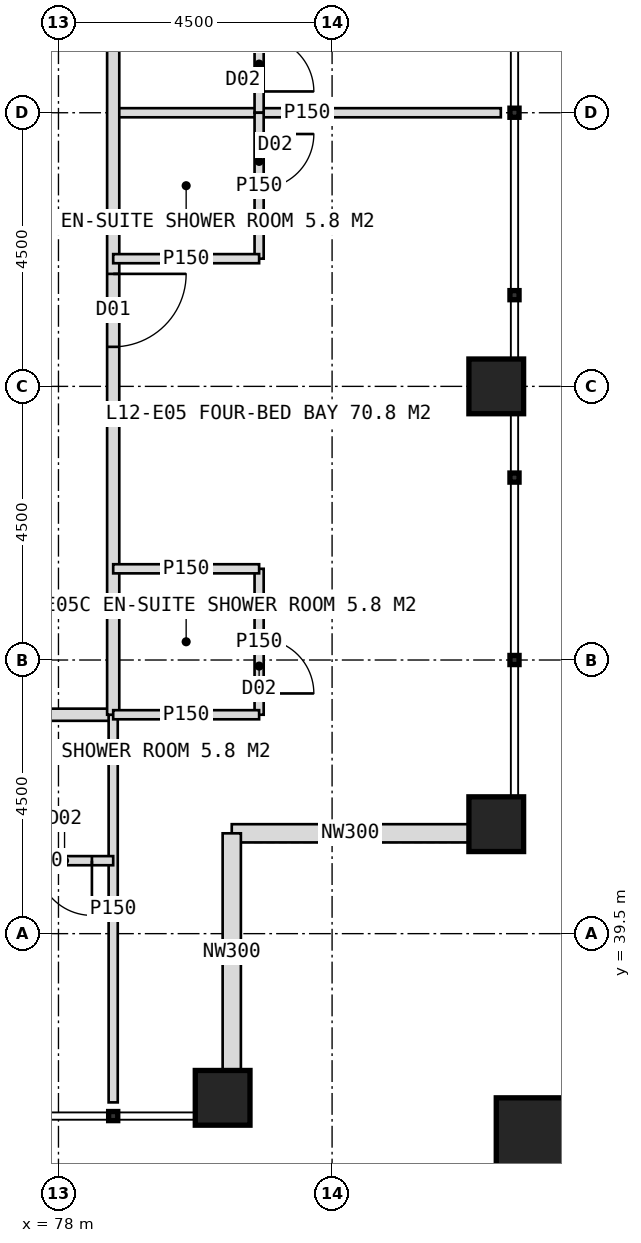
"""IFC4 building model, lengths in metres.
Left out: names, types, materials, properties, quantities, classifications, styles, units other than length and angle.
Written with IfcOpenShell. Run it as: python <this file> out.ifc"""

import sys

from ifc_helpers import new_model, si_unit, direction, frame, frame_2d, origin, origin_2d, place, context, subcontext, project, spatial, rectangle, hollow_rectangle, extrude, element, fill, save


model = new_model("IFC4")
c1 = context("Model", 3, precision=1e-05, world=origin(), true_north=direction((0.0, 1.0)))
c2 = subcontext(c1, "Body", "Model", "MODEL_VIEW")
j1 = project(units=[si_unit("LENGTHUNIT", "METRE"), si_unit("PLANEANGLEUNIT", "RADIAN")], contexts=[c1])
p1 = place(None, origin())
s1 = spatial("IfcSite", under=j1, at=p1, CompositionType="ELEMENT")
p2 = place(p1, origin())
s2 = spatial("IfcBuilding", under=s1, at=p2, CompositionType="ELEMENT")
p3 = place(p2, frame((0.0, 0.0, 55.0)))
s3 = spatial("IfcBuildingStorey", under=s2, at=p3, CompositionType="ELEMENT", Elevation=55.0)
for number, where, z_axis, x_axis in (
    (1, (85.2, 41.3, 0.0), (0.0, 0.0, 1.0), (1.0, 0.0, 0.0)),
    (2, (85.2, 48.5, 0.0), (0.0, 0.0, 1.0), (1.0, 0.0, 0.0)),
    (3, (80.7, 36.8, 0.0), (0.0, 0.0, 1.0), (1.0, 0.0, 0.0)),
):
    element("IfcColumn", number, at=place(p3, frame(where, z_axis=z_axis, x_axis=x_axis)), inside=s3, PredefinedType="COLUMN", context=c2, shape_type="SweptSolid", body=[
        extrude(hollow_rectangle(XDim=0.9, YDim=0.9, WallThickness=0.08, at=origin_2d()), origin(), (0.0, 0.0, 1.0), 4.0),
    ])
p4 = place(p3, frame((86.1, 35.9, 0.0), z_axis=(0.0, 0.0, 1.0), x_axis=(1.0, 0.0, 0.0)))
e4 = element("IfcColumn", 4, at=p4, inside=s3, PredefinedType="COLUMN", context=c2, shape_type="SweptSolid", body=[
    extrude(hollow_rectangle(XDim=1.8, YDim=1.8, WallThickness=0.1, at=origin_2d()), origin(), (0.0, 0.0, 1.0), 4.0),
])
for number, where, z_axis, x_axis in (
    (5, (84.75, 41.15, 0.0), (0.0, 0.0, 1.0), (-1.0, 0.0, 0.0)),
    (6, (80.85, 41.15, 0.0), (0.0, 0.0, 1.0), (0.0, -1.0, 0.0)),
):
    element("IfcWall", number, at=place(p3, frame(where, z_axis=z_axis, x_axis=x_axis)), inside=s3, PredefinedType="ELEMENTEDWALL", context=c2, shape_type="SweptSolid", body=[
        extrude(rectangle(XDim=3.9, YDim=0.3, at=frame_2d((1.95, 0.0))), origin(), (0.0, 0.0, 1.0), 2.95),
    ])
p5 = place(p3, frame((78.9, 43.1, 0.0), z_axis=(0.0, 0.0, 1.0), x_axis=(-1.0, 0.0, 0.0)))
e7 = element("IfcWall", 7, at=p5, inside=s3, PredefinedType="PARTITIONING", context=c2, shape_type="SweptSolid", body=[
    extrude(rectangle(XDim=37.8, YDim=0.2, at=frame_2d((18.9, 0.0))), origin(), (0.0, 0.0, 1.0), 3.75),
])
p6 = place(p5, frame((2.65, 0.0, 0.0)))
e8 = element("IfcOpeningElement", 8, at=p6, cuts=e7, PredefinedType="OPENING", context=c2, shape_type="SweptSolid", body=[
    extrude(rectangle(XDim=1.2, YDim=2.2, at=frame_2d((0.6, 1.1))), frame((0.0, 0.11, 0.0), z_axis=(0.0, -1.0, 0.0), x_axis=(1.0, 0.0, 0.0)), (0.0, 0.0, 1.0), 0.22),
])
p7 = place(p5, frame((12.55, 0.0, 0.0)))
e9 = element("IfcOpeningElement", 9, at=p7, cuts=e7, PredefinedType="OPENING", context=c2, shape_type="SweptSolid", body=[
    extrude(rectangle(XDim=1.2, YDim=2.2, at=frame_2d((0.6, 1.1))), frame((0.0, 0.11, 0.0), z_axis=(0.0, -1.0, 0.0), x_axis=(1.0, 0.0, 0.0)), (0.0, 0.0, 1.0), 0.22),
])
p8 = place(p5, frame((21.55, 0.0, 0.0)))
e10 = element("IfcOpeningElement", 10, at=p8, cuts=e7, PredefinedType="OPENING", context=c2, shape_type="SweptSolid", body=[
    extrude(rectangle(XDim=1.2, YDim=2.2, at=frame_2d((0.6, 1.1))), frame((0.0, 0.11, 0.0), z_axis=(0.0, -1.0, 0.0), x_axis=(1.0, 0.0, 0.0)), (0.0, 0.0, 1.0), 0.22),
])
p9 = place(p5, frame((30.55, 0.0, 0.0)))
e11 = element("IfcOpeningElement", 11, at=p9, cuts=e7, PredefinedType="OPENING", context=c2, shape_type="SweptSolid", body=[
    extrude(rectangle(XDim=1.2, YDim=2.2, at=frame_2d((0.6, 1.1))), frame((0.0, 0.11, 0.0), z_axis=(0.0, -1.0, 0.0), x_axis=(1.0, 0.0, 0.0)), (0.0, 0.0, 1.0), 0.22),
])
p10 = place(p3, frame((78.9, 43.1, 0.0), z_axis=(0.0, 0.0, 1.0), x_axis=(0.0, -1.0, 0.0)))
e12 = element("IfcWall", 12, at=p10, inside=s3, PredefinedType="PARTITIONING", context=c2, shape_type="SweptSolid", body=[
    extrude(rectangle(XDim=6.375, YDim=0.15, at=frame_2d((3.188, 0.0))), origin(), (0.0, 0.0, 1.0), 3.75),
])
p11 = place(p3, frame((78.9, 40.7, 0.0), z_axis=(0.0, 0.0, 1.0), x_axis=(-1.0, 0.0, 0.0)))
e13 = element("IfcWall", 13, at=p11, inside=s3, PredefinedType="PARTITIONING", context=c2, shape_type="SweptSolid", body=[
    extrude(rectangle(XDim=2.4, YDim=0.15, at=frame_2d((1.2, 0.0))), origin(), (0.0, 0.0, 1.0), 3.75),
])
p12 = place(p11, frame((0.35, 0.0, 0.0)))
e14 = element("IfcOpeningElement", 14, at=p12, cuts=e13, PredefinedType="OPENING", context=c2, shape_type="SweptSolid", body=[
    extrude(rectangle(XDim=0.9, YDim=2.1, at=frame_2d((0.45, 1.05))), frame((0.0, 0.085, 0.0), z_axis=(0.0, -1.0, 0.0), x_axis=(1.0, 0.0, 0.0)), (0.0, 0.0, 1.0), 0.17),
])
p13 = place(p3, frame((78.9, 53.0, 0.0), z_axis=(0.0, 0.0, 1.0), x_axis=(1.0, 0.0, 0.0)))
e15 = element("IfcWall", 15, at=p13, inside=s3, PredefinedType="PARTITIONING", context=c2, shape_type="SweptSolid", body=[
    extrude(rectangle(XDim=6.375, YDim=0.15, at=frame_2d((3.188, 0.0))), origin(), (0.0, 0.0, 1.0), 3.75),
])
p14 = place(p3, frame((78.9, 80.9, 0.0), z_axis=(0.0, 0.0, 1.0), x_axis=(0.0, -1.0, 0.0)))
e16 = element("IfcWall", 16, at=p14, inside=s3, PredefinedType="PARTITIONING", context=c2, shape_type="SweptSolid", body=[
    extrude(rectangle(XDim=37.8, YDim=0.2, at=frame_2d((18.9, 0.0))), origin(), (0.0, 0.0, 1.0), 3.75),
])
p15 = place(p14, frame((3.25, 0.0, 0.0)))
e17 = element("IfcOpeningElement", 17, at=p15, cuts=e16, PredefinedType="OPENING", context=c2, shape_type="SweptSolid", body=[
    extrude(rectangle(XDim=1.2, YDim=2.2, at=frame_2d((0.6, 1.1))), frame((0.0, 0.11, 0.0), z_axis=(0.0, -1.0, 0.0), x_axis=(1.0, 0.0, 0.0)), (0.0, 0.0, 1.0), 0.22),
])
p16 = place(p14, frame((9.55, 0.0, 0.0)))
e18 = element("IfcOpeningElement", 18, at=p16, cuts=e16, PredefinedType="OPENING", context=c2, shape_type="SweptSolid", body=[
    extrude(rectangle(XDim=1.2, YDim=2.2, at=frame_2d((0.6, 1.1))), frame((0.0, 0.11, 0.0), z_axis=(0.0, -1.0, 0.0), x_axis=(1.0, 0.0, 0.0)), (0.0, 0.0, 1.0), 0.22),
])
p17 = place(p14, frame((15.55, 0.0, 0.0)))
e19 = element("IfcOpeningElement", 19, at=p17, cuts=e16, PredefinedType="OPENING", context=c2, shape_type="SweptSolid", body=[
    extrude(rectangle(XDim=1.2, YDim=2.2, at=frame_2d((0.6, 1.1))), frame((0.0, 0.11, 0.0), z_axis=(0.0, -1.0, 0.0), x_axis=(1.0, 0.0, 0.0)), (0.0, 0.0, 1.0), 0.22),
])
p18 = place(p14, frame((21.55, 0.0, 0.0)))
e20 = element("IfcOpeningElement", 20, at=p18, cuts=e16, PredefinedType="OPENING", context=c2, shape_type="SweptSolid", body=[
    extrude(rectangle(XDim=1.2, YDim=2.2, at=frame_2d((0.6, 1.1))), frame((0.0, 0.11, 0.0), z_axis=(0.0, -1.0, 0.0), x_axis=(1.0, 0.0, 0.0)), (0.0, 0.0, 1.0), 0.22),
])
p19 = place(p14, frame((30.55, 0.0, 0.0)))
e21 = element("IfcOpeningElement", 21, at=p19, cuts=e16, PredefinedType="OPENING", context=c2, shape_type="SweptSolid", body=[
    extrude(rectangle(XDim=1.2, YDim=2.2, at=frame_2d((0.6, 1.1))), frame((0.0, 0.11, 0.0), z_axis=(0.0, -1.0, 0.0), x_axis=(1.0, 0.0, 0.0)), (0.0, 0.0, 1.0), 0.22),
])
p20 = place(p3, frame((81.3, 55.4, 0.0), z_axis=(0.0, 0.0, 1.0), x_axis=(0.0, -1.0, 0.0)))
e22 = element("IfcWall", 22, at=p20, inside=s3, PredefinedType="PARTITIONING", context=c2, shape_type="SweptSolid", body=[
    extrude(rectangle(XDim=2.4, YDim=0.15, at=frame_2d((1.2, 0.0))), origin(), (0.0, 0.0, 1.0), 3.75),
])
p21 = place(p20, frame((1.15, 0.0, 0.0)))
e23 = element("IfcOpeningElement", 23, at=p21, cuts=e22, PredefinedType="OPENING", context=c2, shape_type="SweptSolid", body=[
    extrude(rectangle(XDim=0.9, YDim=2.1, at=frame_2d((0.45, 1.05))), frame((0.0, 0.085, 0.0), z_axis=(0.0, -1.0, 0.0), x_axis=(1.0, 0.0, 0.0)), (0.0, 0.0, 1.0), 0.17),
])
p22 = place(p3, frame((81.3, 53.0, 0.0), z_axis=(0.0, 0.0, 1.0), x_axis=(0.0, -1.0, 0.0)))
e24 = element("IfcWall", 24, at=p22, inside=s3, PredefinedType="PARTITIONING", context=c2, shape_type="SweptSolid", body=[
    extrude(rectangle(XDim=2.4, YDim=0.15, at=frame_2d((1.2, 0.0))), origin(), (0.0, 0.0, 1.0), 3.75),
])
p23 = place(p22, frame((0.35, 0.0, 0.0)))
e25 = element("IfcOpeningElement", 25, at=p23, cuts=e24, PredefinedType="OPENING", context=c2, shape_type="SweptSolid", body=[
    extrude(rectangle(XDim=0.9, YDim=2.1, at=frame_2d((0.45, 1.05))), frame((0.0, 0.085, 0.0), z_axis=(0.0, -1.0, 0.0), x_axis=(1.0, 0.0, 0.0)), (0.0, 0.0, 1.0), 0.17),
])
p24 = place(p3, frame((78.9, 50.6, 0.0), z_axis=(0.0, 0.0, 1.0), x_axis=(1.0, 0.0, 0.0)))
e26 = element("IfcWall", 26, at=p24, inside=s3, PredefinedType="PARTITIONING", context=c2, shape_type="SweptSolid", body=[
    extrude(rectangle(XDim=2.4, YDim=0.15, at=frame_2d((1.2, 0.0))), origin(), (0.0, 0.0, 1.0), 3.75),
])
p25 = place(p3, frame((81.3, 45.5, 0.0), z_axis=(0.0, 0.0, 1.0), x_axis=(0.0, -1.0, 0.0)))
e27 = element("IfcWall", 27, at=p25, inside=s3, PredefinedType="PARTITIONING", context=c2, shape_type="SweptSolid", body=[
    extrude(rectangle(XDim=2.4, YDim=0.15, at=frame_2d((1.2, 0.0))), origin(), (0.0, 0.0, 1.0), 3.75),
])
p26 = place(p25, frame((1.15, 0.0, 0.0)))
e28 = element("IfcOpeningElement", 28, at=p26, cuts=e27, PredefinedType="OPENING", context=c2, shape_type="SweptSolid", body=[
    extrude(rectangle(XDim=0.9, YDim=2.1, at=frame_2d((0.45, 1.05))), frame((0.0, 0.085, 0.0), z_axis=(0.0, -1.0, 0.0), x_axis=(1.0, 0.0, 0.0)), (0.0, 0.0, 1.0), 0.17),
])
for number, where, z_axis, x_axis in (
    (29, (78.9, 45.5, 0.0), (0.0, 0.0, 1.0), (1.0, 0.0, 0.0)),
    (30, (78.9, 43.1, 0.0), (0.0, 0.0, 1.0), (1.0, 0.0, 0.0)),
):
    element("IfcWall", number, at=place(p3, frame(where, z_axis=z_axis, x_axis=x_axis)), inside=s3, PredefinedType="PARTITIONING", context=c2, shape_type="SweptSolid", body=[
        extrude(rectangle(XDim=2.4, YDim=0.15, at=frame_2d((1.2, 0.0))), origin(), (0.0, 0.0, 1.0), 3.75),
    ])
p27 = place(p12, origin())
e31 = element("IfcDoor", 31, at=p27, inside=s3, OperationType="SINGLE_SWING_LEFT", PredefinedType="DOOR", context=c2, shape_type="SweptSolid", body=[
    extrude(rectangle(XDim=0.9, YDim=2.1, at=frame_2d((0.45, 1.05))), frame((0.0, 0.025, 0.0), z_axis=(0.0, -1.0, 0.0), x_axis=(1.0, 0.0, 0.0)), (0.0, 0.0, 1.0), 0.05),
])
fill(e14, e31)
p28 = place(p21, origin())
e32 = element("IfcDoor", 32, at=p28, inside=s3, OperationType="SINGLE_SWING_RIGHT", PredefinedType="DOOR", context=c2, shape_type="SweptSolid", body=[
    extrude(rectangle(XDim=0.9, YDim=2.1, at=frame_2d((0.45, 1.05))), frame((0.0, 0.025, 0.0), z_axis=(0.0, -1.0, 0.0), x_axis=(1.0, 0.0, 0.0)), (0.0, 0.0, 1.0), 0.05),
])
fill(e23, e32)
p29 = place(p19, origin())
e33 = element("IfcDoor", 33, at=p29, inside=s3, OperationType="SINGLE_SWING_LEFT", PredefinedType="DOOR", context=c2, shape_type="SweptSolid", body=[
    extrude(rectangle(XDim=1.2, YDim=2.2, at=frame_2d((0.6, 1.1))), frame((0.0, 0.025, 0.0), z_axis=(0.0, -1.0, 0.0), x_axis=(1.0, 0.0, 0.0)), (0.0, 0.0, 1.0), 0.05),
])
fill(e21, e33)
p30 = place(p23, origin())
e34 = element("IfcDoor", 34, at=p30, inside=s3, OperationType="SINGLE_SWING_LEFT", PredefinedType="DOOR", context=c2, shape_type="SweptSolid", body=[
    extrude(rectangle(XDim=0.9, YDim=2.1, at=frame_2d((0.45, 1.05))), frame((0.0, 0.025, 0.0), z_axis=(0.0, -1.0, 0.0), x_axis=(1.0, 0.0, 0.0)), (0.0, 0.0, 1.0), 0.05),
])
fill(e25, e34)
p31 = place(p26, origin())
e35 = element("IfcDoor", 35, at=p31, inside=s3, OperationType="SINGLE_SWING_RIGHT", PredefinedType="DOOR", context=c2, shape_type="SweptSolid", body=[
    extrude(rectangle(XDim=0.9, YDim=2.1, at=frame_2d((0.45, 1.05))), frame((0.0, 0.025, 0.0), z_axis=(0.0, -1.0, 0.0), x_axis=(1.0, 0.0, 0.0)), (0.0, 0.0, 1.0), 0.05),
])
fill(e28, e35)
save(model, sys.argv[1])
